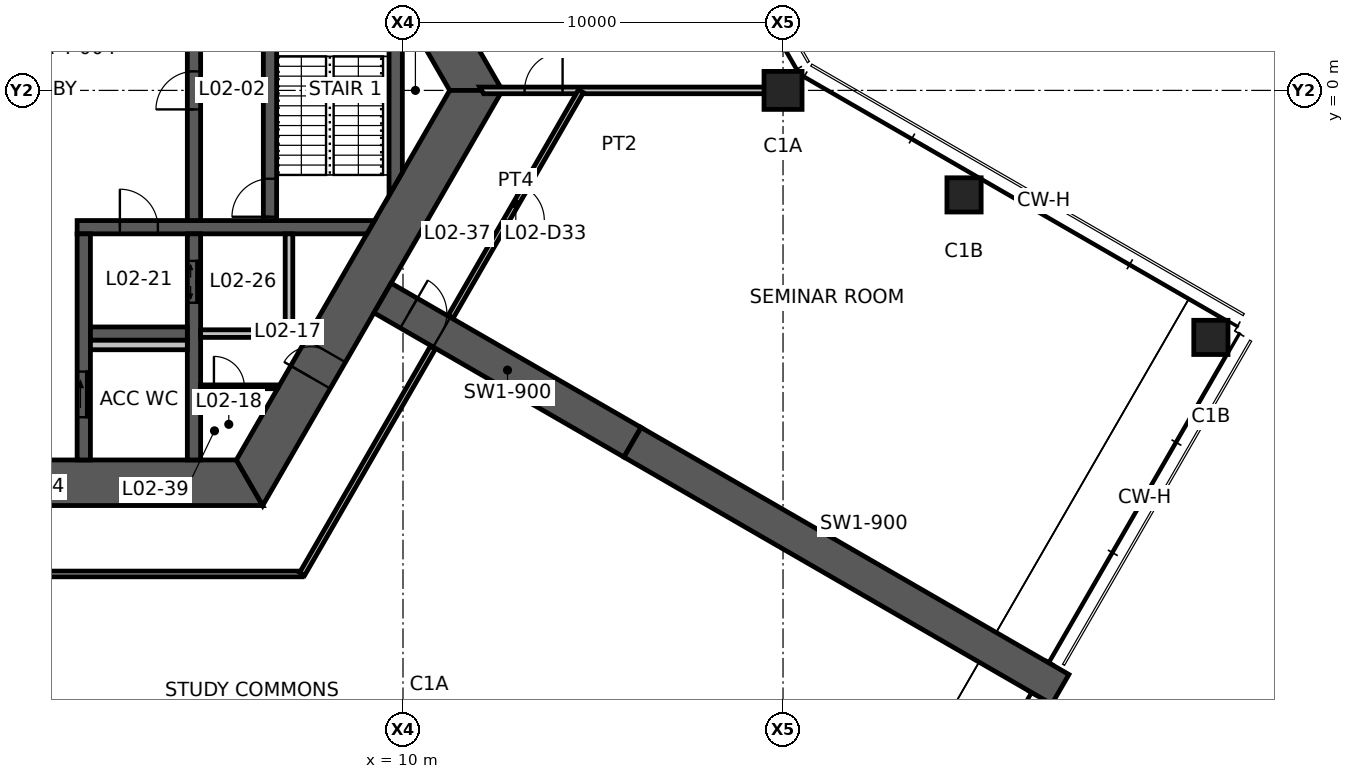
"""IFC4 building model, lengths in metres.
Left out: names, types, materials, properties, quantities, classifications, styles, units other than length and angle.
Written with IfcOpenShell. Run it as: python <this file> out.ifc"""

import sys

from ifc_helpers import new_model, si_unit, direction, frame, frame_2d, origin, origin_2d, place, context, subcontext, project, spatial, polyline, rectangle, hollow_rectangle, outline, extrude, element, fill, save


model = new_model("IFC4")
c1 = context("Model", 3, precision=1e-05, world=origin(), true_north=direction((0.0, 1.0)))
c2 = subcontext(c1, "Body", "Model", "MODEL_VIEW")
j1 = project(units=[si_unit("LENGTHUNIT", "METRE"), si_unit("PLANEANGLEUNIT", "RADIAN")], contexts=[c1])
p1 = place(None, origin())
s1 = spatial("IfcSite", under=j1, at=p1, CompositionType="ELEMENT")
p2 = place(p1, origin())
s2 = spatial("IfcBuilding", under=s1, at=p2, CompositionType="ELEMENT")
p3 = place(p2, frame((0.0, 0.0, 5.5)))
s3 = spatial("IfcBuildingStorey", under=s2, at=p3, CompositionType="ELEMENT", Elevation=5.5)
p4 = place(p3, frame((20.0, 0.0, 0.0), z_axis=(0.0, 0.0, 1.0), x_axis=(1.0, 0.0, 0.0)))
e1 = element("IfcColumn", 1, at=p4, inside=s3, PredefinedType="COLUMN", context=c2, shape_type="SweptSolid", body=[
    extrude(hollow_rectangle(XDim=1.0, YDim=1.0, WallThickness=0.06, at=origin_2d()), origin(), (0.0, 0.0, 1.0), 4.5),
])
for number, where, z_axis, x_axis in (
    (2, (24.763, -2.75, 0.0), (0.0, 0.0, 1.0), (1.0, 0.0, 0.0)),
    (3, (31.258, -6.5, 0.0), (0.0, 0.0, 1.0), (1.0, 0.0, 0.0)),
):
    element("IfcColumn", number, at=place(p3, frame(where, z_axis=z_axis, x_axis=x_axis)), inside=s3, PredefinedType="COLUMN", context=c2, shape_type="SweptSolid", body=[
        extrude(hollow_rectangle(XDim=0.9, YDim=0.9, WallThickness=0.05, at=origin_2d()), origin(), (0.0, 0.0, 1.0), 4.5),
    ])
p5 = place(p3, frame((11.922, 0.0, 0.0), z_axis=(0.0, 0.0, 1.0), x_axis=(-0.500004296715, 0.866022923061, 0.0)))
e4 = element("IfcWall", 4, at=p5, inside=s3, PredefinedType="SHEAR", context=c2, shape_type="SweptSolid", body=[
    extrude(outline(polyline([(-0.346, -0.6), (5.835, -0.6), (6.635, -0.6), (12.269, -0.6), (11.576, 0.6), (6.635, 0.6), (5.835, 0.6), (0.346, 0.6), (-0.346, -0.6)])), origin(), (0.0, 0.0, 1.0), 4.5),
])
p6 = place(p5, frame((5.835, 0.0, 0.0)))
e5 = element("IfcOpeningElement", 5, at=p6, cuts=e4, PredefinedType="OPENING", context=c2, shape_type="SweptSolid", body=[
    extrude(rectangle(XDim=0.8, YDim=2.1, at=frame_2d((0.4, 1.05))), frame((0.0, 0.61, 0.0), z_axis=(0.0, -1.0, 0.0), x_axis=(1.0, 0.0, 0.0)), (0.0, 0.0, 1.0), 1.22),
])
p7 = place(p3, frame((-5.961, -10.325, 0.0), z_axis=(0.0, 0.0, 1.0), x_axis=(1.0, 0.0, 0.0)))
e6 = element("IfcWall", 6, at=p7, inside=s3, PredefinedType="SHEAR", context=c2, shape_type="SweptSolid", body=[
    extrude(outline(polyline([(-0.346, -0.6), (5.461, -0.6), (6.461, -0.6), (12.269, -0.6), (11.576, 0.6), (6.461, 0.6), (5.461, 0.6), (0.346, 0.6), (-0.346, -0.6)])), origin(), (0.0, 0.0, 1.0), 4.5),
])
p8 = place(p7, frame((5.461, 0.0, 0.0)))
e7 = element("IfcOpeningElement", 7, at=p8, cuts=e6, PredefinedType="OPENING", context=c2, shape_type="SweptSolid", body=[
    extrude(rectangle(XDim=1.0, YDim=2.1, at=frame_2d((0.5, 1.05))), frame((0.0, 0.61, 0.0), z_axis=(0.0, -1.0, 0.0), x_axis=(1.0, 0.0, 0.0)), (0.0, 0.0, 1.0), 1.22),
])
p9 = place(p3, frame((5.961, -10.325, 0.0), z_axis=(0.0, 0.0, 1.0), x_axis=(0.500004296715, 0.866022923061, 0.0)))
e8 = element("IfcWall", 8, at=p9, inside=s3, PredefinedType="SHEAR", context=c2, shape_type="SweptSolid", body=[
    extrude(outline(polyline([(-0.346, -0.6), (3.208, -0.6), (4.009, -0.6), (12.269, -0.6), (11.576, 0.6), (4.009, 0.6), (3.208, 0.6), (0.346, 0.6), (-0.346, -0.6)])), origin(), (0.0, 0.0, 1.0), 4.5),
])
p10 = place(p9, frame((3.208, 0.0, 0.0)))
e9 = element("IfcOpeningElement", 9, at=p10, cuts=e8, PredefinedType="OPENING", context=c2, shape_type="SweptSolid", body=[
    extrude(rectangle(XDim=0.8, YDim=2.1, at=frame_2d((0.4, 1.05))), frame((0.0, 0.61, 0.0), z_axis=(0.0, -1.0, 0.0), x_axis=(1.0, 0.0, 0.0)), (0.0, 0.0, 1.0), 1.22),
])
p11 = place(p3, frame((9.461, -5.462, 0.0), z_axis=(0.0, 0.0, 1.0), x_axis=(0.866019116917, -0.500010889016, 0.0)))
e10 = element("IfcWall", 10, at=p11, inside=s3, PredefinedType="SHEAR", context=c2, shape_type="SweptSolid", body=[
    extrude(rectangle(XDim=7.595, YDim=0.9, at=frame_2d((3.798, 0.0))), origin(), (0.0, 0.0, 1.0), 4.5),
])
p12 = place(p11, frame((0.8, 0.0, 0.0)))
e11 = element("IfcOpeningElement", 11, at=p12, cuts=e10, PredefinedType="OPENING", context=c2, shape_type="SweptSolid", body=[
    extrude(rectangle(XDim=1.0, YDim=2.1, at=frame_2d((0.5, 1.05))), frame((0.0, 0.46, 0.0), z_axis=(0.0, -1.0, 0.0), x_axis=(1.0, 0.0, 0.0)), (0.0, 0.0, 1.0), 0.92),
])
p13 = place(p3, frame((16.039, -9.26, 0.0), z_axis=(0.0, 0.0, 1.0), x_axis=(0.866024837091, -0.50000098154, 0.0)))
e12 = element("IfcWall", 12, at=p13, inside=s3, PredefinedType="SHEAR", context=c2, shape_type="SweptSolid", body=[
    extrude(rectangle(XDim=13.0, YDim=0.9, at=frame_2d((6.5, 0.0))), origin(), (0.0, 0.0, 1.0), 4.5),
])
p14 = place(p3, frame((1.425, -3.6, 0.0), z_axis=(0.0, 0.0, 1.0), x_axis=(1.0, 0.0, 0.0)))
e13 = element("IfcWall", 13, at=p14, inside=s3, PredefinedType="SHEAR", context=c2, shape_type="SweptSolid", body=[
    extrude(outline(polyline([(0.0, -0.175), (1.125, -0.175), (2.125, -0.175), (7.625, -0.175), (7.827, 0.175), (2.125, 0.175), (1.125, 0.175), (0.0, 0.175), (0.0, -0.175)])), origin(), (0.0, 0.0, 1.0), 4.5),
])
p15 = place(p14, frame((1.125, 0.0, 0.0)))
e14 = element("IfcOpeningElement", 14, at=p15, cuts=e13, PredefinedType="OPENING", context=c2, shape_type="SweptSolid", body=[
    extrude(rectangle(XDim=1.0, YDim=2.1, at=frame_2d((0.5, 1.05))), frame((0.0, 0.185, 0.0), z_axis=(0.0, -1.0, 0.0), x_axis=(1.0, 0.0, 0.0)), (0.0, 0.0, 1.0), 0.37),
])
p16 = place(p3, frame((1.6, -3.775, 0.0), z_axis=(0.0, 0.0, 1.0), x_axis=(0.0, -1.0, 0.0)))
e15 = element("IfcWall", 15, at=p16, inside=s3, PredefinedType="SHEAR", context=c2, shape_type="SweptSolid", body=[
    extrude(rectangle(XDim=5.95, YDim=0.35, at=frame_2d((2.975, 0.0))), origin(), (0.0, 0.0, 1.0), 4.5),
])
p17 = place(p16, frame((3.625, 0.0, 0.0)))
e16 = element("IfcOpeningElement", 16, at=p17, cuts=e15, PredefinedType="OPENING", context=c2, shape_type="SweptSolid", body=[
    extrude(rectangle(XDim=1.2, YDim=2.1, at=frame_2d((0.6, 1.05))), frame((0.0, 0.185, 0.0), z_axis=(0.0, -1.0, 0.0), x_axis=(1.0, 0.0, 0.0)), (0.0, 0.0, 1.0), 0.37),
])
p18 = place(p3, frame((4.5, -3.425, 0.0), z_axis=(0.0, 0.0, 1.0), x_axis=(0.0, 1.0, 0.0)))
e17 = element("IfcWall", 17, at=p18, inside=s3, PredefinedType="SHEAR", context=c2, shape_type="SweptSolid", body=[
    extrude(rectangle(XDim=6.85, YDim=0.35, at=frame_2d((3.425, 0.0))), origin(), (0.0, 0.0, 1.0), 4.5),
])
p19 = place(p18, frame((2.925, 0.0, 0.0)))
e18 = element("IfcOpeningElement", 18, at=p19, cuts=e17, PredefinedType="OPENING", context=c2, shape_type="SweptSolid", body=[
    extrude(rectangle(XDim=1.0, YDim=2.1, at=frame_2d((0.5, 1.05))), frame((0.0, 0.185, 0.0), z_axis=(0.0, -1.0, 0.0), x_axis=(1.0, 0.0, 0.0)), (0.0, 0.0, 1.0), 0.37),
])
p20 = place(p3, frame((6.5, -3.425, 0.0), z_axis=(0.0, 0.0, 1.0), x_axis=(0.0, 1.0, 0.0)))
e19 = element("IfcWall", 19, at=p20, inside=s3, PredefinedType="SHEAR", context=c2, shape_type="SweptSolid", body=[
    extrude(rectangle(XDim=6.85, YDim=0.35, at=frame_2d((3.425, 0.0))), origin(), (0.0, 0.0, 1.0), 4.5),
])
p21 = place(p20, frame((0.1, 0.0, 0.0)))
e20 = element("IfcOpeningElement", 20, at=p21, cuts=e19, PredefinedType="OPENING", context=c2, shape_type="SweptSolid", body=[
    extrude(rectangle(XDim=1.0, YDim=2.1, at=frame_2d((0.5, 1.05))), frame((0.0, 0.185, 0.0), z_axis=(0.0, -1.0, 0.0), x_axis=(1.0, 0.0, 0.0)), (0.0, 0.0, 1.0), 0.37),
])
p22 = place(p3, frame((4.5, -3.775, 0.0), z_axis=(0.0, 0.0, 1.0), x_axis=(0.0, -1.0, 0.0)))
e21 = element("IfcWall", 21, at=p22, inside=s3, PredefinedType="SHEAR", context=c2, shape_type="SweptSolid", body=[
    extrude(rectangle(XDim=5.95, YDim=0.35, at=frame_2d((2.975, 0.0))), origin(), (0.0, 0.0, 1.0), 4.5),
])
p23 = place(p22, frame((0.712, 0.0, 0.0)))
e22 = element("IfcOpeningElement", 22, at=p23, cuts=e21, PredefinedType="OPENING", context=c2, shape_type="SweptSolid", body=[
    extrude(rectangle(XDim=1.1, YDim=2.1, at=frame_2d((0.55, 1.05))), frame((0.0, 0.185, 0.0), z_axis=(0.0, -1.0, 0.0), x_axis=(1.0, 0.0, 0.0)), (0.0, 0.0, 1.0), 0.37),
])
p24 = place(p3, frame((1.775, -6.4, 0.0), z_axis=(0.0, 0.0, 1.0), x_axis=(1.0, 0.0, 0.0)))
e23 = element("IfcWall", 23, at=p24, inside=s3, PredefinedType="SHEAR", context=c2, shape_type="SweptSolid", body=[
    extrude(rectangle(XDim=2.55, YDim=0.35, at=frame_2d((1.275, 0.0))), origin(), (0.0, 0.0, 1.0), 4.5),
])
p25 = place(p3, frame((9.808, -2.462, 0.0), z_axis=(0.0, 0.0, 1.0), x_axis=(0.0, 1.0, 0.0)))
e24 = element("IfcWall", 24, at=p25, inside=s3, PredefinedType="SHEAR", context=c2, shape_type="SweptSolid", body=[
    extrude(outline(polyline([(0.303, -0.175), (4.621, -0.175), (5.228, 0.175), (-0.303, 0.175), (0.303, -0.175)])), origin(), (0.0, 0.0, 1.0), 4.5),
])
p26 = place(p3, frame((4.675, -6.4, 0.0), z_axis=(0.0, 0.0, 1.0), x_axis=(1.0, 0.0, 0.0)))
e25 = element("IfcWall", 25, at=p26, inside=s3, PredefinedType="STANDARD", context=c2, shape_type="SweptSolid", body=[
    extrude(rectangle(XDim=2.425, YDim=0.2, at=frame_2d((1.212, 0.0))), origin(), (0.0, 0.0, 1.0), 4.5),
])
p27 = place(p3, frame((7.0, -3.775, 0.0), z_axis=(0.0, 0.0, 1.0), x_axis=(0.0, -1.0, 0.0)))
e26 = element("IfcWall", 26, at=p27, inside=s3, PredefinedType="STANDARD", context=c2, shape_type="SweptSolid", body=[
    extrude(rectangle(XDim=2.525, YDim=0.2, at=frame_2d((1.263, 0.0))), origin(), (0.0, 0.0, 1.0), 4.5),
])
p28 = place(p3, frame((1.775, -6.7, 0.0), z_axis=(0.0, 0.0, 1.0), x_axis=(1.0, 0.0, 0.0)))
e27 = element("IfcWall", 27, at=p28, inside=s3, PredefinedType="PLUMBINGWALL", context=c2, shape_type="SweptSolid", body=[
    extrude(rectangle(XDim=2.55, YDim=0.25, at=frame_2d((1.275, 0.0))), origin(), (0.0, 0.0, 1.0), 4.5),
])
p29 = place(p3, frame((4.675, -7.8, 0.0), z_axis=(0.0, 0.0, 1.0), x_axis=(1.0, 0.0, 0.0)))
e28 = element("IfcWall", 28, at=p29, inside=s3, PredefinedType="PARTITIONING", context=c2, shape_type="SweptSolid", body=[
    extrude(outline(polyline([(0.0, -0.05), (0.35, -0.05), (1.15, -0.05), (2.022, -0.05), (2.051, 0.0), (2.057, 0.05), (1.15, 0.05), (0.35, 0.05), (0.0, 0.05), (0.0, -0.05)])), origin(), (0.0, 0.0, 1.0), 3.5),
])
p30 = place(p29, frame((0.35, 0.0, 0.0)))
e29 = element("IfcOpeningElement", 29, at=p30, cuts=e28, PredefinedType="OPENING", context=c2, shape_type="SweptSolid", body=[
    extrude(rectangle(XDim=0.8, YDim=2.1, at=frame_2d((0.4, 1.05))), frame((0.0, 0.06, 0.0), z_axis=(0.0, -1.0, 0.0), x_axis=(1.0, 0.0, 0.0)), (0.0, 0.0, 1.0), 0.12),
])
p31 = place(p3, frame((12.07, 0.0, 0.0), z_axis=(0.0, 0.0, 1.0), x_axis=(1.0, 0.0, 0.0)))
e30 = element("IfcWall", 30, at=p31, inside=s3, PredefinedType="PARTITIONING", context=c2, shape_type="SweptSolid", body=[
    extrude(outline(polyline([(0.051, -0.087), (1.129, -0.087), (2.129, -0.087), (7.93, -0.087), (7.93, 0.087), (2.129, 0.087), (1.129, 0.087), (-0.051, 0.087), (0.051, -0.087)])), origin(), (0.0, 0.0, 1.0), 3.6),
])
p32 = place(p31, frame((1.129, 0.0, 0.0)))
e31 = element("IfcOpeningElement", 31, at=p32, cuts=e30, PredefinedType="OPENING", context=c2, shape_type="SweptSolid", body=[
    extrude(rectangle(XDim=1.0, YDim=2.1, at=frame_2d((0.5, 1.05))), frame((0.0, 0.098, 0.0), z_axis=(0.0, -1.0, 0.0), x_axis=(1.0, 0.0, 0.0)), (0.0, 0.0, 1.0), 0.195),
])
p33 = place(p3, frame((14.682, -0.02, 0.0), z_axis=(0.0, 0.0, 1.0), x_axis=(-0.499985579985, -0.866033729024, 0.0)))
e32 = element("IfcWall", 32, at=p33, inside=s3, PredefinedType="PARTITIONING", context=c2, shape_type="SweptSolid", body=[
    extrude(rectangle(XDim=6.854, YDim=0.15, at=frame_2d((3.427, 0.0))), origin(), (0.0, 0.0, 1.0), 3.5),
])
p34 = place(p33, frame((2.927, 0.0, 0.0)))
e33 = element("IfcOpeningElement", 33, at=p34, cuts=e32, PredefinedType="OPENING", context=c2, shape_type="SweptSolid", body=[
    extrude(rectangle(XDim=1.0, YDim=2.1, at=frame_2d((0.5, 1.05))), frame((0.0, 0.085, 0.0), z_axis=(0.0, -1.0, 0.0), x_axis=(1.0, 0.0, 0.0)), (0.0, 0.0, 1.0), 0.17),
])
p35 = place(p3, frame((7.347, -12.725, 0.0), z_axis=(0.0, 0.0, 1.0), x_axis=(-1.0, 0.0, 0.0)))
e34 = element("IfcWall", 34, at=p35, inside=s3, PredefinedType="PARTITIONING", context=c2, shape_type="SweptSolid", body=[
    extrude(rectangle(XDim=14.67, YDim=0.15, at=frame_2d((7.335, 0.0))), origin(), (0.0, 0.0, 1.0), 3.5),
])
p36 = place(p35, frame((6.835, 0.0, 0.0)))
e35 = element("IfcOpeningElement", 35, at=p36, cuts=e34, PredefinedType="OPENING", context=c2, shape_type="SweptSolid", body=[
    extrude(rectangle(XDim=1.0, YDim=2.1, at=frame_2d((0.5, 1.05))), frame((0.0, 0.085, 0.0), z_axis=(0.0, -1.0, 0.0), x_axis=(1.0, 0.0, 0.0)), (0.0, 0.0, 1.0), 0.17),
])
p37 = place(p3, frame((10.785, -6.77, 0.0), z_axis=(0.0, 0.0, 1.0), x_axis=(-0.500003129455, -0.866023596985, 0.0)))
e36 = element("IfcWall", 36, at=p37, inside=s3, PredefinedType="PARTITIONING", context=c2, shape_type="SweptSolid", body=[
    extrude(rectangle(XDim=6.877, YDim=0.15, at=frame_2d((3.438, 0.0))), origin(), (0.0, 0.0, 1.0), 3.5),
])
p38 = place(p10, origin())
e37 = element("IfcDoor", 37, at=p38, inside=s3, OperationType="SINGLE_SWING_LEFT", PredefinedType="DOOR", context=c2, shape_type="SweptSolid", body=[
    extrude(rectangle(XDim=0.8, YDim=2.1, at=frame_2d((0.4, 1.05))), frame((0.0, 0.025, 0.0), z_axis=(0.0, -1.0, 0.0), x_axis=(1.0, 0.0, 0.0)), (0.0, 0.0, 1.0), 0.05),
])
fill(e9, e37)
p39 = place(p19, origin())
e38 = element("IfcDoor", 38, at=p39, inside=s3, OperationType="SINGLE_SWING_LEFT", PredefinedType="DOOR", context=c2, shape_type="SweptSolid", body=[
    extrude(rectangle(XDim=1.0, YDim=2.1, at=frame_2d((0.5, 1.05))), frame((0.0, 0.025, 0.0), z_axis=(0.0, -1.0, 0.0), x_axis=(1.0, 0.0, 0.0)), (0.0, 0.0, 1.0), 0.05),
])
fill(e18, e38)
p40 = place(p21, origin())
e39 = element("IfcDoor", 39, at=p40, inside=s3, OperationType="SINGLE_SWING_LEFT", PredefinedType="DOOR", context=c2, shape_type="SweptSolid", body=[
    extrude(rectangle(XDim=1.0, YDim=2.1, at=frame_2d((0.5, 1.05))), frame((0.0, 0.025, 0.0), z_axis=(0.0, -1.0, 0.0), x_axis=(1.0, 0.0, 0.0)), (0.0, 0.0, 1.0), 0.05),
])
fill(e20, e39)
p41 = place(p17, origin())
e40 = element("IfcDoor", 40, at=p41, inside=s3, OperationType="SLIDING_TO_LEFT", PredefinedType="DOOR", context=c2, shape_type="SweptSolid", body=[
    extrude(rectangle(XDim=1.2, YDim=2.1, at=frame_2d((0.6, 1.05))), frame((0.0, 0.025, 0.0), z_axis=(0.0, -1.0, 0.0), x_axis=(1.0, 0.0, 0.0)), (0.0, 0.0, 1.0), 0.05),
])
fill(e16, e40)
p42 = place(p15, origin())
e41 = element("IfcDoor", 41, at=p42, inside=s3, OperationType="SINGLE_SWING_LEFT", PredefinedType="DOOR", context=c2, shape_type="SweptSolid", body=[
    extrude(rectangle(XDim=1.0, YDim=2.1, at=frame_2d((0.5, 1.05))), frame((0.0, 0.025, 0.0), z_axis=(0.0, -1.0, 0.0), x_axis=(1.0, 0.0, 0.0)), (0.0, 0.0, 1.0), 0.05),
])
fill(e14, e41)
p43 = place(p12, origin())
e42 = element("IfcDoor", 42, at=p43, inside=s3, OperationType="SINGLE_SWING_LEFT", PredefinedType="DOOR", context=c2, shape_type="SweptSolid", body=[
    extrude(rectangle(XDim=1.0, YDim=2.1, at=frame_2d((0.5, 1.05))), frame((0.0, 0.025, 0.0), z_axis=(0.0, -1.0, 0.0), x_axis=(1.0, 0.0, 0.0)), (0.0, 0.0, 1.0), 0.05),
])
fill(e11, e42)
p44 = place(p30, origin())
e43 = element("IfcDoor", 43, at=p44, inside=s3, OperationType="SINGLE_SWING_LEFT", PredefinedType="DOOR", context=c2, shape_type="SweptSolid", body=[
    extrude(rectangle(XDim=0.8, YDim=2.1, at=frame_2d((0.4, 1.05))), frame((0.0, 0.025, 0.0), z_axis=(0.0, -1.0, 0.0), x_axis=(1.0, 0.0, 0.0)), (0.0, 0.0, 1.0), 0.05),
])
fill(e29, e43)
p45 = place(p32, origin())
e44 = element("IfcDoor", 44, at=p45, inside=s3, OperationType="SINGLE_SWING_RIGHT", PredefinedType="DOOR", context=c2, shape_type="SweptSolid", body=[
    extrude(rectangle(XDim=1.0, YDim=2.1, at=frame_2d((0.5, 1.05))), frame((0.0, 0.025, 0.0), z_axis=(0.0, -1.0, 0.0), x_axis=(1.0, 0.0, 0.0)), (0.0, 0.0, 1.0), 0.05),
])
fill(e31, e44)
p46 = place(p34, origin())
e45 = element("IfcDoor", 45, at=p46, inside=s3, OperationType="SINGLE_SWING_RIGHT", PredefinedType="DOOR", context=c2, shape_type="SweptSolid", body=[
    extrude(rectangle(XDim=1.0, YDim=2.1, at=frame_2d((0.5, 1.05))), frame((0.0, 0.025, 0.0), z_axis=(0.0, -1.0, 0.0), x_axis=(1.0, 0.0, 0.0)), (0.0, 0.0, 1.0), 0.05),
])
fill(e33, e45)
p47 = place(p23, origin())
e46 = element("IfcDoor", 46, at=p47, inside=s3, OperationType="DOUBLE_DOOR_SLIDING", PredefinedType="DOOR", context=c2, shape_type="SweptSolid", body=[
    extrude(rectangle(XDim=1.1, YDim=2.1, at=frame_2d((0.55, 1.05))), frame((0.0, 0.025, 0.0), z_axis=(0.0, -1.0, 0.0), x_axis=(1.0, 0.0, 0.0)), (0.0, 0.0, 1.0), 0.05),
])
fill(e22, e46)
save(model, sys.argv[1])
